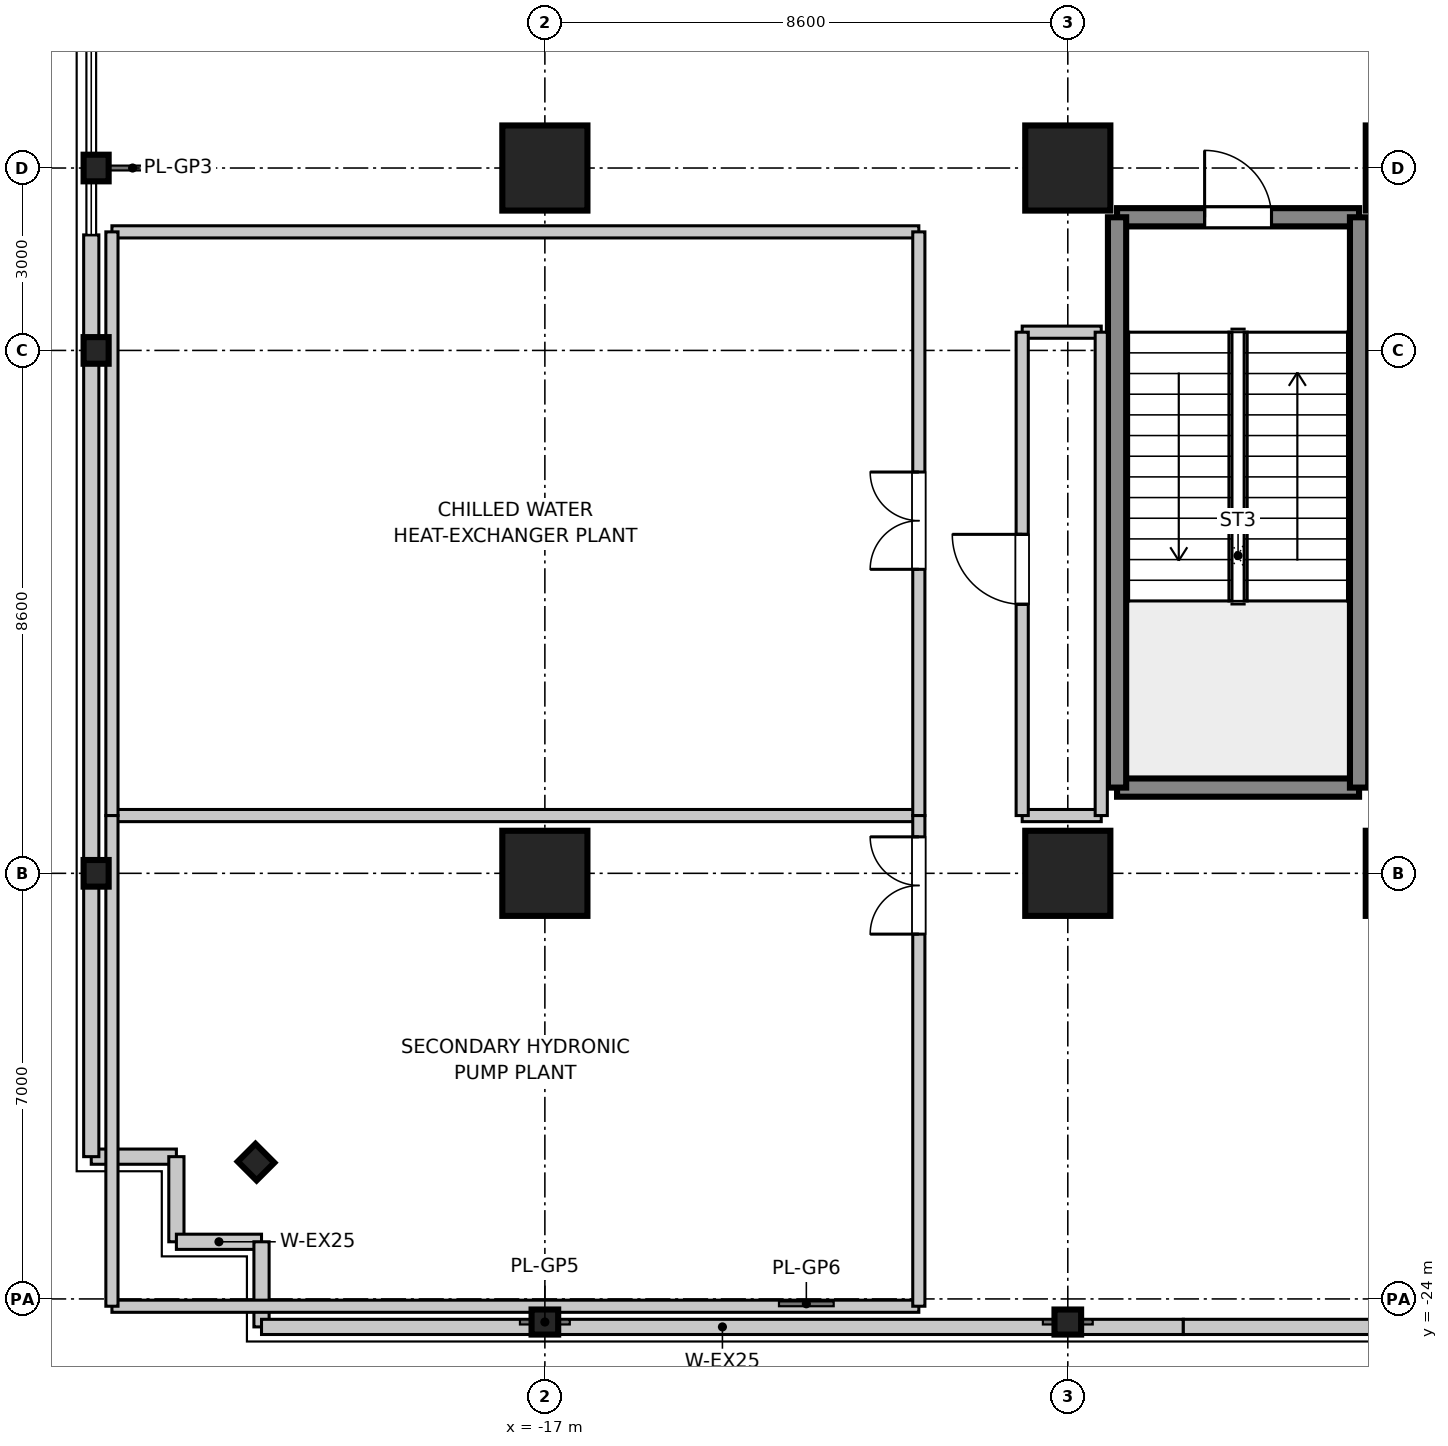
"""IFC4 building model, lengths in metres.
Left out: names, types, materials, properties, quantities, classifications, styles, units other than length and angle.
Written with IfcOpenShell. Run it as: python <this file> out.ifc"""

import sys

from ifc_helpers import new_model, si_unit, direction, frame, frame_2d, origin, origin_2d, place, context, subcontext, project, spatial, rectangle, i_section, extrude, source, transform, mapped, element, fill, save


model = new_model("IFC4")
c1 = context("Model", 3, precision=1e-05, world=origin(), true_north=direction((0.0, 1.0)))
c2 = subcontext(c1, "Body", "Model", "MODEL_VIEW")
j1 = project(units=[si_unit("LENGTHUNIT", "METRE"), si_unit("PLANEANGLEUNIT", "RADIAN")], contexts=[c1])
p1 = place(None, origin())
s1 = spatial("IfcSite", under=j1, at=p1, CompositionType="ELEMENT")
p2 = place(p1, origin())
s2 = spatial("IfcBuilding", under=s1, at=p2, CompositionType="ELEMENT")
p3 = place(p2, frame((0.0, 0.0, 83.5)))
s3 = spatial("IfcBuildingStorey", under=s2, at=p3, CompositionType="ELEMENT", Elevation=83.5)
m1 = source(origin(), c2, "Body", "SweptSolid", [
    extrude(rectangle(XDim=1.4, YDim=1.4, at=origin_2d()), origin(), (0.0, 0.0, 1.0), 4.755),
])
for number, where, z_axis, x_axis in (
    (1, (-17.0, -17.0, 0.0), (0.0, 0.0, 1.0), (1.0, 0.0, 0.0)),
    (2, (-17.0, -5.4, 0.0), (0.0, 0.0, 1.0), (1.0, 0.0, 0.0)),
    (3, (-8.4, -17.0, 0.0), (0.0, 0.0, 1.0), (1.0, 0.0, 0.0)),
    (4, (-8.4, -5.4, 0.0), (0.0, 0.0, 1.0), (1.0, 0.0, 0.0)),
    (5, (-2.8, -17.0, 0.0), (0.0, 0.0, 1.0), (1.0, 0.0, 0.0)),
    (6, (-2.8, -5.4, 0.0), (0.0, 0.0, 1.0), (1.0, 0.0, 0.0)),
):
    element("IfcColumn", number, at=place(p3, frame(where, z_axis=z_axis, x_axis=x_axis)), inside=s3, PredefinedType="COLUMN", context=c2, shape_type="MappedRepresentation", body=[
        mapped(m1, transform((0.0, 0.0, 0.0), scale=1.0)),
    ])
m2 = source(origin(), c2, "Body", "SweptSolid", [
    extrude(i_section(OverallWidth=0.412, OverallDepth=0.438, WebThickness=0.023, FlangeThickness=0.036, at=origin_2d()), origin(), (0.0, 0.0, 1.0), 4.694),
])
for number, where, z_axis, x_axis in (
    (7, (-24.38, -17.0, 0.0), (0.128, 0.0, 0.992), (0.0, 1.0, 0.0)),
    (8, (-24.38, -8.4, 0.0), (0.128, 0.0, 0.992), (0.0, 1.0, 0.0)),
    (9, (-24.38, -5.4, 0.0), (0.128, 0.0, 0.992), (0.0, 1.0, 0.0)),
    (10, (-17.0, -24.38, 0.0), (0.0, 0.128, 0.992), (0.0, -0.992, 0.128)),
    (11, (-8.4, -24.38, 0.0), (0.0, 0.128, 0.992), (0.0, -0.992, 0.128)),
):
    element("IfcColumn", number, at=place(p3, frame(where, z_axis=z_axis, x_axis=x_axis)), inside=s3, PredefinedType="COLUMN", context=c2, shape_type="MappedRepresentation", body=[
        mapped(m2, transform((0.0, 0.0, 0.0), scale=1.0)),
    ])
m3 = source(origin(), c2, "Body", "SweptSolid", [
    extrude(i_section(OverallWidth=0.412, OverallDepth=0.438, WebThickness=0.023, FlangeThickness=0.036, at=origin_2d()), origin(), (0.0, 0.0, 1.0), 4.732),
])
p4 = place(p3, frame((-21.75, -21.75, 0.0), z_axis=(0.126823408548, 0.126823408548, 0.983784349382), x_axis=(-0.991892174691, 0.008107825309, 0.126823408548)))
e12 = element("IfcColumn", 12, at=p4, inside=s3, PredefinedType="COLUMN", context=c2, shape_type="MappedRepresentation", body=[
    mapped(m3, transform((0.0, 0.0, 0.0), scale=1.0)),
])
m4 = source(origin(), c2, "Body", "SweptSolid", [
    extrude(rectangle(XDim=3.98, YDim=0.3, at=frame_2d((1.99, 0.0))), origin(), (0.0, 0.0, 1.0), 4.53),
])
p5 = place(p3, frame((-7.59, -15.59, 0.0), z_axis=(0.0, 0.0, 1.0), x_axis=(1.0, 0.0, 0.0)))
e13 = element("IfcWall", 13, at=p5, inside=s3, PredefinedType="SHEAR", context=c2, shape_type="MappedRepresentation", body=[
    mapped(m4, transform((0.0, 0.0, 0.0), scale=1.0)),
])
p6 = place(p3, frame((-7.59, -6.21, 0.0), z_axis=(0.0, 0.0, 1.0), x_axis=(1.0, 0.0, 0.0)))
e14 = element("IfcWall", 14, at=p6, inside=s3, PredefinedType="SHEAR", context=c2, shape_type="MappedRepresentation", body=[
    mapped(m4, transform((0.0, 0.0, 0.0), scale=1.0)),
])
p7 = place(p6, frame((1.44, 0.0, 0.0)))
e15 = element("IfcOpeningElement", 15, at=p7, cuts=e14, PredefinedType="OPENING", context=c2, shape_type="SweptSolid", body=[
    extrude(rectangle(XDim=1.1, YDim=2.15, at=frame_2d((0.55, 1.075))), frame((0.0, 0.16, 0.0), z_axis=(0.0, -1.0, 0.0), x_axis=(1.0, 0.0, 0.0)), (0.0, 0.0, 1.0), 0.32),
])
m5 = source(origin(), c2, "Body", "SweptSolid", [
    extrude(rectangle(XDim=9.38, YDim=0.3, at=frame_2d((4.69, 0.0))), origin(), (0.0, 0.0, 1.0), 4.53),
])
for number, where, z_axis, x_axis in (
    (16, (-7.59, -15.59, 0.0), (0.0, 0.0, 1.0), (0.0, 1.0, 0.0)),
    (17, (-3.61, -15.59, 0.0), (0.0, 0.0, 1.0), (0.0, 1.0, 0.0)),
):
    element("IfcWall", number, at=place(p3, frame(where, z_axis=z_axis, x_axis=x_axis)), inside=s3, PredefinedType="SHEAR", context=c2, shape_type="MappedRepresentation", body=[
        mapped(m5, transform((0.0, 0.0, 0.0), scale=1.0)),
    ])
m6 = source(origin(), c2, "Body", "SweptSolid", [
    extrude(rectangle(XDim=1.4, YDim=0.25, at=frame_2d((0.7, 0.0))), origin(), (0.0, 0.0, 1.0), 4.53),
])
p8 = place(p3, frame((-24.46, -21.66, 0.0), z_axis=(0.0, 0.0, 1.0), x_axis=(1.0, 0.0, 0.0)))
e18 = element("IfcWall", 18, at=p8, inside=s3, PredefinedType="STANDARD", context=c2, shape_type="MappedRepresentation", body=[
    mapped(m6, transform((0.0, 0.0, 0.0), scale=1.0)),
])
m7 = source(origin(), c2, "Body", "SweptSolid", [
    extrude(rectangle(XDim=1.4, YDim=0.25, at=frame_2d((0.7, 0.0))), origin(), (0.0, 0.0, 1.0), 4.53),
])
for number, where, z_axis, x_axis in (
    (19, (-23.06, -23.06, 0.0), (0.0, 0.0, 1.0), (0.0, 1.0, 0.0)),
    (20, (-23.06, -23.06, 0.0), (0.0, 0.0, 1.0), (1.0, 0.0, 0.0)),
):
    element("IfcWall", number, at=place(p3, frame(where, z_axis=z_axis, x_axis=x_axis)), inside=s3, PredefinedType="STANDARD", context=c2, shape_type="MappedRepresentation", body=[
        mapped(m7, transform((0.0, 0.0, 0.0), scale=1.0)),
    ])
p9 = place(p3, frame((-21.66, -24.46, 0.0), z_axis=(0.0, 0.0, 1.0), x_axis=(0.0, 1.0, 0.0)))
e21 = element("IfcWall", 21, at=p9, inside=s3, PredefinedType="STANDARD", context=c2, shape_type="MappedRepresentation", body=[
    mapped(m6, transform((0.0, 0.0, 0.0), scale=1.0)),
])
m8 = source(origin(), c2, "Body", "SweptSolid", [
    extrude(rectangle(XDim=15.16, YDim=0.25, at=frame_2d((7.58, 0.0))), origin(), (0.0, 0.0, 1.0), 4.01),
])
p10 = place(p3, frame((-21.66, -24.46, 0.0), z_axis=(0.0, 0.0, 1.0), x_axis=(1.0, 0.0, 0.0)))
e22 = element("IfcWall", 22, at=p10, inside=s3, PredefinedType="STANDARD", context=c2, shape_type="MappedRepresentation", body=[
    mapped(m8, transform((0.0, 0.0, 0.0), scale=1.0)),
])
m9 = source(origin(), c2, "Body", "SweptSolid", [
    extrude(rectangle(XDim=13.0, YDim=0.25, at=frame_2d((6.5, 0.0))), origin(), (0.0, 0.0, 1.0), 4.01),
])
p11 = place(p3, frame((-6.5, -24.46, 0.0), z_axis=(0.0, 0.0, 1.0), x_axis=(1.0, 0.0, 0.0)))
e23 = element("IfcWall", 23, at=p11, inside=s3, PredefinedType="STANDARD", context=c2, shape_type="MappedRepresentation", body=[
    mapped(m9, transform((0.0, 0.0, 0.0), scale=1.0)),
])
p12 = place(p3, frame((-24.46, -21.66, 0.0), z_axis=(0.0, 0.0, 1.0), x_axis=(0.0, 1.0, 0.0)))
e24 = element("IfcWall", 24, at=p12, inside=s3, PredefinedType="STANDARD", context=c2, shape_type="MappedRepresentation", body=[
    mapped(m8, transform((0.0, 0.0, 0.0), scale=1.0)),
])
m10 = source(origin(), c2, "Body", "SweptSolid", [
    extrude(rectangle(XDim=1.3, YDim=0.2, at=frame_2d((0.65, 0.0))), origin(), (0.0, 0.0, 1.0), 3.4),
])
for number, where, z_axis, x_axis in (
    (25, (-9.15, -16.05, 0.0), (0.0, 0.0, 1.0), (1.0, 0.0, 0.0)),
    (26, (-9.15, -8.1, 0.0), (0.0, 0.0, 1.0), (1.0, 0.0, 0.0)),
):
    element("IfcWall", number, at=place(p3, frame(where, z_axis=z_axis, x_axis=x_axis)), inside=s3, PredefinedType="PARTITIONING", context=c2, shape_type="MappedRepresentation", body=[
        mapped(m10, transform((0.0, 0.0, 0.0), scale=1.0)),
    ])
m11 = source(origin(), c2, "Body", "SweptSolid", [
    extrude(rectangle(XDim=7.95, YDim=0.2, at=frame_2d((3.975, 0.0))), origin(), (0.0, 0.0, 1.0), 3.4),
])
p13 = place(p3, frame((-9.15, -16.05, 0.0), z_axis=(0.0, 0.0, 1.0), x_axis=(0.0, 1.0, 0.0)))
e27 = element("IfcWall", 27, at=p13, inside=s3, PredefinedType="PARTITIONING", context=c2, shape_type="MappedRepresentation", body=[
    mapped(m11, transform((0.0, 0.0, 0.0), scale=1.0)),
])
p14 = place(p13, frame((3.475, 0.0, 0.0)))
e28 = element("IfcOpeningElement", 28, at=p14, cuts=e27, PredefinedType="OPENING", context=c2, shape_type="SweptSolid", body=[
    extrude(rectangle(XDim=1.15, YDim=2.15, at=frame_2d((0.575, 1.075))), frame((0.0, 0.11, 0.0), z_axis=(0.0, -1.0, 0.0), x_axis=(1.0, 0.0, 0.0)), (0.0, 0.0, 1.0), 0.22),
])
p15 = place(p3, frame((-7.85, -16.05, 0.0), z_axis=(0.0, 0.0, 1.0), x_axis=(0.0, 1.0, 0.0)))
e29 = element("IfcWall", 29, at=p15, inside=s3, PredefinedType="PARTITIONING", context=c2, shape_type="MappedRepresentation", body=[
    mapped(m11, transform((0.0, 0.0, 0.0), scale=1.0)),
])
m12 = source(origin(), c2, "Body", "SweptSolid", [
    extrude(rectangle(XDim=13.27, YDim=0.2, at=frame_2d((6.635, 0.0))), origin(), (0.0, 0.0, 1.0), 3.4),
])
for number, where, z_axis, x_axis in (
    (30, (-24.12, -16.05, 0.0), (0.0, 0.0, 1.0), (1.0, 0.0, 0.0)),
    (31, (-24.12, -6.45, 0.0), (0.0, 0.0, 1.0), (1.0, 0.0, 0.0)),
):
    element("IfcWall", number, at=place(p3, frame(where, z_axis=z_axis, x_axis=x_axis)), inside=s3, PredefinedType="PARTITIONING", context=c2, shape_type="MappedRepresentation", body=[
        mapped(m12, transform((0.0, 0.0, 0.0), scale=1.0)),
    ])
m13 = source(origin(), c2, "Body", "SweptSolid", [
    extrude(rectangle(XDim=9.6, YDim=0.2, at=frame_2d((4.8, 0.0))), origin(), (0.0, 0.0, 1.0), 3.4),
])
p16 = place(p3, frame((-24.12, -16.05, 0.0), z_axis=(0.0, 0.0, 1.0), x_axis=(0.0, 1.0, 0.0)))
e32 = element("IfcWall", 32, at=p16, inside=s3, PredefinedType="PARTITIONING", context=c2, shape_type="MappedRepresentation", body=[
    mapped(m13, transform((0.0, 0.0, 0.0), scale=1.0)),
])
p17 = place(p3, frame((-10.85, -16.05, 0.0), z_axis=(0.0, 0.0, 1.0), x_axis=(0.0, 1.0, 0.0)))
e33 = element("IfcWall", 33, at=p17, inside=s3, PredefinedType="PARTITIONING", context=c2, shape_type="MappedRepresentation", body=[
    mapped(m13, transform((0.0, 0.0, 0.0), scale=1.0)),
])
p18 = place(p17, frame((4.05, 0.0, 0.0)))
e34 = element("IfcOpeningElement", 34, at=p18, cuts=e33, PredefinedType="OPENING", context=c2, shape_type="SweptSolid", body=[
    extrude(rectangle(XDim=1.6, YDim=2.15, at=frame_2d((0.8, 1.075))), frame((0.0, 0.11, 0.0), z_axis=(0.0, -1.0, 0.0), x_axis=(1.0, 0.0, 0.0)), (0.0, 0.0, 1.0), 0.22),
])
p19 = place(p3, frame((-24.12, -24.12, 0.0), z_axis=(0.0, 0.0, 1.0), x_axis=(1.0, 0.0, 0.0)))
e35 = element("IfcWall", 35, at=p19, inside=s3, PredefinedType="PARTITIONING", context=c2, shape_type="MappedRepresentation", body=[
    mapped(m12, transform((0.0, 0.0, 0.0), scale=1.0)),
])
m14 = source(origin(), c2, "Body", "SweptSolid", [
    extrude(rectangle(XDim=8.07, YDim=0.2, at=frame_2d((4.035, 0.0))), origin(), (0.0, 0.0, 1.0), 3.4),
])
p20 = place(p3, frame((-24.12, -24.12, 0.0), z_axis=(0.0, 0.0, 1.0), x_axis=(0.0, 1.0, 0.0)))
e36 = element("IfcWall", 36, at=p20, inside=s3, PredefinedType="PARTITIONING", context=c2, shape_type="MappedRepresentation", body=[
    mapped(m14, transform((0.0, 0.0, 0.0), scale=1.0)),
])
p21 = place(p3, frame((-10.85, -24.12, 0.0), z_axis=(0.0, 0.0, 1.0), x_axis=(0.0, 1.0, 0.0)))
e37 = element("IfcWall", 37, at=p21, inside=s3, PredefinedType="PARTITIONING", context=c2, shape_type="MappedRepresentation", body=[
    mapped(m14, transform((0.0, 0.0, 0.0), scale=1.0)),
])
p22 = place(p21, frame((6.12, 0.0, 0.0)))
e38 = element("IfcOpeningElement", 38, at=p22, cuts=e37, PredefinedType="OPENING", context=c2, shape_type="SweptSolid", body=[
    extrude(rectangle(XDim=1.6, YDim=2.15, at=frame_2d((0.8, 1.075))), frame((0.0, 0.11, 0.0), z_axis=(0.0, -1.0, 0.0), x_axis=(1.0, 0.0, 0.0)), (0.0, 0.0, 1.0), 0.22),
])
m15 = source(origin(), c2, "Body", "SweptSolid", [
    extrude(rectangle(XDim=1.1, YDim=2.15, at=frame_2d((0.55, 1.075))), frame((0.0, 0.025, 0.0), z_axis=(0.0, -1.0, 0.0), x_axis=(1.0, 0.0, 0.0)), (0.0, 0.0, 1.0), 0.05),
])
p23 = place(p7, frame((1.1, 0.0, 0.0), z_axis=(0.0, 0.0, 1.0), x_axis=(-1.0, 0.0, 0.0)))
e39 = element("IfcDoor", 39, at=p23, inside=s3, OperationType="SINGLE_SWING_LEFT", PredefinedType="DOOR", context=c2, shape_type="MappedRepresentation", body=[
    mapped(m15, transform((0.0, 0.0, 0.0), scale=1.0)),
])
fill(e15, e39)
m16 = source(origin(), c2, "Body", "SweptSolid", [
    extrude(rectangle(XDim=1.15, YDim=2.15, at=frame_2d((0.575, 1.075))), frame((0.0, 0.025, 0.0), z_axis=(0.0, -1.0, 0.0), x_axis=(1.0, 0.0, 0.0)), (0.0, 0.0, 1.0), 0.05),
])
p24 = place(p14, frame((1.15, 0.0, 0.0), z_axis=(0.0, 0.0, 1.0), x_axis=(-1.0, 0.0, 0.0)))
e40 = element("IfcDoor", 40, at=p24, inside=s3, OperationType="SINGLE_SWING_RIGHT", PredefinedType="DOOR", context=c2, shape_type="MappedRepresentation", body=[
    mapped(m16, transform((0.0, 0.0, 0.0), scale=1.0)),
])
fill(e28, e40)
m17 = source(origin(), c2, "Body", "SweptSolid", [
    extrude(rectangle(XDim=1.6, YDim=2.15, at=frame_2d((0.8, 1.075))), frame((0.0, 0.025, 0.0), z_axis=(0.0, -1.0, 0.0), x_axis=(1.0, 0.0, 0.0)), (0.0, 0.0, 1.0), 0.05),
])
p25 = place(p18, origin())
e41 = element("IfcDoor", 41, at=p25, inside=s3, OperationType="DOUBLE_DOOR_SINGLE_SWING", PredefinedType="DOOR", context=c2, shape_type="MappedRepresentation", body=[
    mapped(m17, transform((0.0, 0.0, 0.0), scale=1.0)),
])
fill(e34, e41)
p26 = place(p22, origin())
e42 = element("IfcDoor", 42, at=p26, inside=s3, OperationType="DOUBLE_DOOR_SINGLE_SWING", PredefinedType="DOOR", context=c2, shape_type="MappedRepresentation", body=[
    mapped(m17, transform((0.0, 0.0, 0.0), scale=1.0)),
])
fill(e38, e42)
save(model, sys.argv[1])
